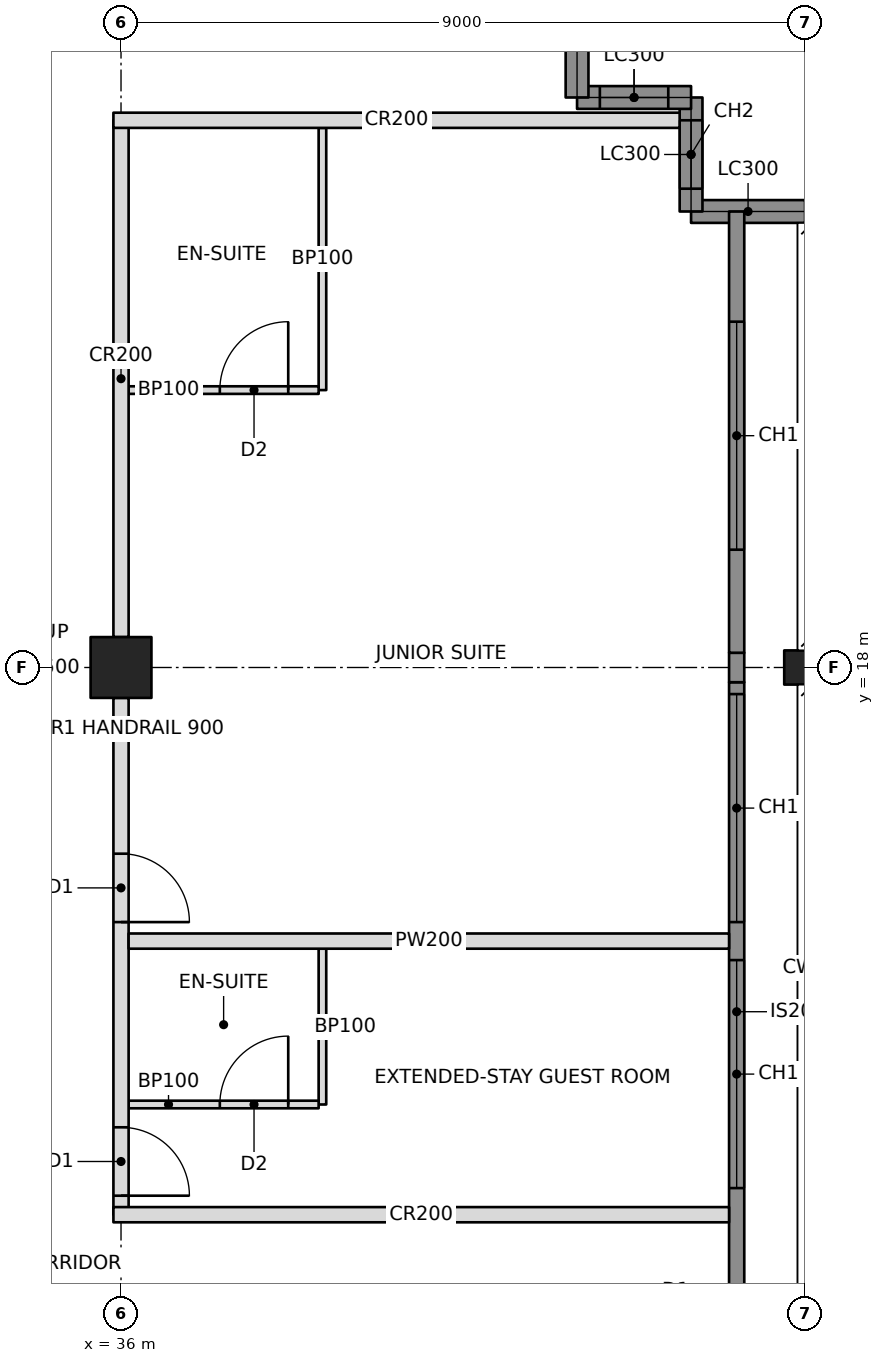
"""IFC4 building model, lengths in metres.
Left out: names, types, materials, properties, quantities, classifications, styles, units other than length and angle.
Written with IfcOpenShell. Run it as: python <this file> out.ifc"""

import sys

from ifc_helpers import new_model, si_unit, direction, frame, frame_2d, origin, origin_2d, place, context, subcontext, project, spatial, rectangle, hollow_rectangle, i_section, extrude, element, fill, save


model = new_model("IFC4")
c1 = context("Model", 3, precision=1e-05, world=origin(), true_north=direction((0.0, 1.0)))
c2 = subcontext(c1, "Body", "Model", "MODEL_VIEW")
j1 = project(units=[si_unit("LENGTHUNIT", "METRE"), si_unit("PLANEANGLEUNIT", "RADIAN")], contexts=[c1])
p1 = place(None, origin())
s1 = spatial("IfcSite", under=j1, at=p1, CompositionType="ELEMENT")
p2 = place(p1, origin())
s2 = spatial("IfcBuilding", under=s1, at=p2, CompositionType="ELEMENT")
p3 = place(p2, frame((0.0, 0.0, 180.8)))
s3 = spatial("IfcBuildingStorey", under=s2, at=p3, CompositionType="ELEMENT", Elevation=180.8)
p4 = place(p3, frame((36.0, 18.0, 0.0), z_axis=(0.0, 0.0, 1.0), x_axis=(0.0, 1.0, 0.0)))
e1 = element("IfcColumn", 1, at=p4, inside=s3, PredefinedType="COLUMN", context=c2, shape_type="SweptSolid", body=[
    extrude(hollow_rectangle(XDim=0.8, YDim=0.8, WallThickness=0.06, at=origin_2d()), origin(), (0.0, 0.0, 1.0), 3.4),
])
p5 = place(p3, frame((45.0, 18.0, 0.0), z_axis=(0.0, 0.0, 1.0), x_axis=(0.0, 1.0, 0.0)))
e2 = element("IfcColumn", 2, at=p5, inside=s3, PredefinedType="COLUMN", context=c2, shape_type="SweptSolid", body=[
    extrude(i_section(OverallWidth=0.449, OverallDepth=0.549, WebThickness=0.072, FlangeThickness=0.115, at=origin_2d()), origin(), (0.0, 0.0, 1.0), 3.4),
])
p6 = place(p3, frame((45.0, 24.0, 0.0), z_axis=(0.0, 0.0, 1.0), x_axis=(-1.0, 0.0, 0.0)))
e3 = element("IfcWall", 3, at=p6, inside=s3, PredefinedType="SOLIDWALL", context=c2, shape_type="SweptSolid", body=[
    extrude(rectangle(XDim=1.5, YDim=0.3, at=frame_2d((0.75, 0.0))), origin(), (0.0, 0.0, 1.0), 2.42),
])
p7 = place(p3, frame((43.5, 24.0, 0.0), z_axis=(0.0, 0.0, 1.0), x_axis=(0.0, 1.0, 0.0)))
e4 = element("IfcWall", 4, at=p7, inside=s3, PredefinedType="SOLIDWALL", context=c2, shape_type="SweptSolid", body=[
    extrude(rectangle(XDim=1.5, YDim=0.3, at=frame_2d((0.75, 0.0))), origin(), (0.0, 0.0, 1.0), 3.2),
])
p8 = place(p7, frame((0.3, 0.0, 0.6)))
e5 = element("IfcOpeningElement", 5, at=p8, cuts=e4, PredefinedType="OPENING", context=c2, shape_type="SweptSolid", body=[
    extrude(rectangle(XDim=0.9, YDim=2.2, at=frame_2d((0.45, 1.1))), frame((0.0, 0.16, 0.0), z_axis=(0.0, -1.0, 0.0), x_axis=(1.0, 0.0, 0.0)), (0.0, 0.0, 1.0), 0.32),
])
p9 = place(p3, frame((43.5, 25.5, 0.0), z_axis=(0.0, 0.0, 1.0), x_axis=(-1.0, 0.0, 0.0)))
e6 = element("IfcWall", 6, at=p9, inside=s3, PredefinedType="SOLIDWALL", context=c2, shape_type="SweptSolid", body=[
    extrude(rectangle(XDim=1.5, YDim=0.3, at=frame_2d((0.75, 0.0))), origin(), (0.0, 0.0, 1.0), 3.2),
])
p10 = place(p9, frame((0.3, 0.0, 0.6)))
e7 = element("IfcOpeningElement", 7, at=p10, cuts=e6, PredefinedType="OPENING", context=c2, shape_type="SweptSolid", body=[
    extrude(rectangle(XDim=0.9, YDim=2.2, at=frame_2d((0.45, 1.1))), frame((0.0, 0.16, 0.0), z_axis=(0.0, -1.0, 0.0), x_axis=(1.0, 0.0, 0.0)), (0.0, 0.0, 1.0), 0.32),
])
p11 = place(p3, frame((42.0, 25.5, 0.0), z_axis=(0.0, 0.0, 1.0), x_axis=(0.0, 1.0, 0.0)))
e8 = element("IfcWall", 8, at=p11, inside=s3, PredefinedType="SOLIDWALL", context=c2, shape_type="SweptSolid", body=[
    extrude(rectangle(XDim=1.5, YDim=0.3, at=frame_2d((0.75, 0.0))), origin(), (0.0, 0.0, 1.0), 2.42),
])
p12 = place(p3, frame((36.0, 10.8, 0.0), z_axis=(0.0, 0.0, 1.0), x_axis=(0.0, 1.0, 0.0)))
e9 = element("IfcWall", 9, at=p12, inside=s3, PredefinedType="PARTITIONING", context=c2, shape_type="SweptSolid", body=[
    extrude(rectangle(XDim=6.8, YDim=0.2, at=frame_2d((3.4, 0.0))), origin(), (0.0, 0.0, 1.0), 2.405),
])
p13 = place(p12, frame((0.25, 0.0, 0.0)))
e10 = element("IfcOpeningElement", 10, at=p13, cuts=e9, PredefinedType="OPENING", context=c2, shape_type="SweptSolid", body=[
    extrude(rectangle(XDim=0.9, YDim=2.1, at=frame_2d((0.45, 1.05))), frame((0.0, 0.11, 0.0), z_axis=(0.0, -1.0, 0.0), x_axis=(1.0, 0.0, 0.0)), (0.0, 0.0, 1.0), 0.22),
])
p14 = place(p12, frame((3.85, 0.0, 0.0)))
e11 = element("IfcOpeningElement", 11, at=p14, cuts=e9, PredefinedType="OPENING", context=c2, shape_type="SweptSolid", body=[
    extrude(rectangle(XDim=0.9, YDim=2.1, at=frame_2d((0.45, 1.05))), frame((0.0, 0.11, 0.0), z_axis=(0.0, -1.0, 0.0), x_axis=(1.0, 0.0, 0.0)), (0.0, 0.0, 1.0), 0.22),
])
p15 = place(p3, frame((36.0, 18.4, 0.0), z_axis=(0.0, 0.0, 1.0), x_axis=(0.0, 1.0, 0.0)))
e12 = element("IfcWall", 12, at=p15, inside=s3, PredefinedType="PARTITIONING", context=c2, shape_type="SweptSolid", body=[
    extrude(rectangle(XDim=6.8, YDim=0.2, at=frame_2d((3.4, 0.0))), origin(), (0.0, 0.0, 1.0), 2.405),
])
p16 = place(p3, frame((35.9, 10.8, 0.0), z_axis=(0.0, 0.0, 1.0), x_axis=(1.0, 0.0, 0.0)))
e13 = element("IfcWall", 13, at=p16, inside=s3, PredefinedType="PARTITIONING", context=c2, shape_type="SweptSolid", body=[
    extrude(rectangle(XDim=8.1, YDim=0.2, at=frame_2d((4.05, 0.0))), origin(), (0.0, 0.0, 1.0), 2.404),
])
p17 = place(p3, frame((35.9, 25.2, 0.0), z_axis=(0.0, 0.0, 1.0), x_axis=(1.0, 0.0, 0.0)))
e14 = element("IfcWall", 14, at=p17, inside=s3, PredefinedType="PARTITIONING", context=c2, shape_type="SweptSolid", body=[
    extrude(rectangle(XDim=7.45, YDim=0.2, at=frame_2d((3.725, 0.0))), origin(), (0.0, 0.0, 1.0), 2.404),
])
p18 = place(p3, frame((36.1, 14.4, 0.0), z_axis=(0.0, 0.0, 1.0), x_axis=(1.0, 0.0, 0.0)))
e15 = element("IfcWall", 15, at=p18, inside=s3, PredefinedType="PARTITIONING", context=c2, shape_type="SweptSolid", body=[
    extrude(rectangle(XDim=7.9, YDim=0.2, at=frame_2d((3.95, 0.0))), origin(), (0.0, 0.0, 1.0), 2.404),
])
p19 = place(p3, frame((38.65, 12.25, 0.0), z_axis=(0.0, 0.0, 1.0), x_axis=(0.0, 1.0, 0.0)))
e16 = element("IfcWall", 16, at=p19, inside=s3, PredefinedType="PARTITIONING", context=c2, shape_type="SweptSolid", body=[
    extrude(rectangle(XDim=2.05, YDim=0.1, at=frame_2d((1.025, 0.0))), origin(), (0.0, 0.0, 1.0), 3.2),
])
p20 = place(p3, frame((36.1, 12.25, 0.0), z_axis=(0.0, 0.0, 1.0), x_axis=(1.0, 0.0, 0.0)))
e17 = element("IfcWall", 17, at=p20, inside=s3, PredefinedType="PARTITIONING", context=c2, shape_type="SweptSolid", body=[
    extrude(rectangle(XDim=2.5, YDim=0.1, at=frame_2d((1.25, 0.0))), origin(), (0.0, 0.0, 1.0), 2.404),
])
p21 = place(p20, frame((1.2, 0.0, 0.0)))
e18 = element("IfcOpeningElement", 18, at=p21, cuts=e17, PredefinedType="OPENING", context=c2, shape_type="SweptSolid", body=[
    extrude(rectangle(XDim=0.9, YDim=2.1, at=frame_2d((0.45, 1.05))), frame((0.0, 0.06, 0.0), z_axis=(0.0, -1.0, 0.0), x_axis=(1.0, 0.0, 0.0)), (0.0, 0.0, 1.0), 0.12),
])
p22 = place(p3, frame((38.65, 21.65, 0.0), z_axis=(0.0, 0.0, 1.0), x_axis=(0.0, 1.0, 0.0)))
e19 = element("IfcWall", 19, at=p22, inside=s3, PredefinedType="PARTITIONING", context=c2, shape_type="SweptSolid", body=[
    extrude(rectangle(XDim=3.45, YDim=0.1, at=frame_2d((1.725, 0.0))), origin(), (0.0, 0.0, 1.0), 3.2),
])
p23 = place(p3, frame((36.1, 21.65, 0.0), z_axis=(0.0, 0.0, 1.0), x_axis=(1.0, 0.0, 0.0)))
e20 = element("IfcWall", 20, at=p23, inside=s3, PredefinedType="PARTITIONING", context=c2, shape_type="SweptSolid", body=[
    extrude(rectangle(XDim=2.5, YDim=0.1, at=frame_2d((1.25, 0.0))), origin(), (0.0, 0.0, 1.0), 2.404),
])
p24 = place(p23, frame((1.2, 0.0, 0.0)))
e21 = element("IfcOpeningElement", 21, at=p24, cuts=e20, PredefinedType="OPENING", context=c2, shape_type="SweptSolid", body=[
    extrude(rectangle(XDim=0.9, YDim=2.1, at=frame_2d((0.45, 1.05))), frame((0.0, 0.06, 0.0), z_axis=(0.0, -1.0, 0.0), x_axis=(1.0, 0.0, 0.0)), (0.0, 0.0, 1.0), 0.12),
])
p25 = place(p3, frame((44.1, 9.135, 0.0), z_axis=(0.0, 0.0, 1.0), x_axis=(0.0, 1.0, 0.0)))
e22 = element("IfcWall", 22, at=p25, inside=s3, PredefinedType="SOLIDWALL", context=c2, shape_type="SweptSolid", body=[
    extrude(rectangle(XDim=8.671, YDim=0.2, at=frame_2d((4.335, 0.0))), origin(), (0.0, 0.0, 1.0), 3.2),
])
p26 = place(p25, frame((2.015, 0.0, 0.6)))
e23 = element("IfcOpeningElement", 23, at=p26, cuts=e22, PredefinedType="OPENING", context=c2, shape_type="SweptSolid", body=[
    extrude(rectangle(XDim=3.0, YDim=2.2, at=frame_2d((1.5, 1.1))), frame((0.0, 0.11, 0.0), z_axis=(0.0, -1.0, 0.0), x_axis=(1.0, 0.0, 0.0)), (0.0, 0.0, 1.0), 0.22),
])
p27 = place(p25, frame((5.515, 0.0, 0.6)))
e24 = element("IfcOpeningElement", 24, at=p27, cuts=e22, PredefinedType="OPENING", context=c2, shape_type="SweptSolid", body=[
    extrude(rectangle(XDim=3.0, YDim=2.2, at=frame_2d((1.5, 1.1))), frame((0.0, 0.11, 0.0), z_axis=(0.0, -1.0, 0.0), x_axis=(1.0, 0.0, 0.0)), (0.0, 0.0, 1.0), 0.22),
])
p28 = place(p3, frame((44.1, 17.806, 0.0), z_axis=(0.0, 0.0, 1.0), x_axis=(0.0, 1.0, 0.0)))
e25 = element("IfcWall", 25, at=p28, inside=s3, PredefinedType="SOLIDWALL", context=c2, shape_type="SweptSolid", body=[
    extrude(rectangle(XDim=0.388, YDim=0.2, at=frame_2d((0.194, 0.0))), origin(), (0.0, 0.0, 1.0), 2.404),
])
p29 = place(p3, frame((44.1, 18.194, 0.0), z_axis=(0.0, 0.0, 1.0), x_axis=(0.0, 1.0, 0.0)))
e26 = element("IfcWall", 26, at=p29, inside=s3, PredefinedType="SOLIDWALL", context=c2, shape_type="SweptSolid", body=[
    extrude(rectangle(XDim=5.806, YDim=0.2, at=frame_2d((2.903, 0.0))), origin(), (0.0, 0.0, 1.0), 3.2),
])
p30 = place(p29, frame((1.356, 0.0, 0.6)))
e27 = element("IfcOpeningElement", 27, at=p30, cuts=e26, PredefinedType="OPENING", context=c2, shape_type="SweptSolid", body=[
    extrude(rectangle(XDim=3.0, YDim=2.2, at=frame_2d((1.5, 1.1))), frame((0.0, 0.11, 0.0), z_axis=(0.0, -1.0, 0.0), x_axis=(1.0, 0.0, 0.0)), (0.0, 0.0, 1.0), 0.22),
])
p31 = place(p8, origin())
e28 = element("IfcWindow", 28, at=p31, inside=s3, PartitioningType="SINGLE_PANEL", PredefinedType="WINDOW", context=c2, shape_type="SweptSolid", body=[
    extrude(rectangle(XDim=0.9, YDim=2.2, at=frame_2d((0.45, 1.1))), frame((0.0, 0.03, 0.0), z_axis=(0.0, -1.0, 0.0), x_axis=(1.0, 0.0, 0.0)), (0.0, 0.0, 1.0), 0.06),
])
fill(e5, e28)
p32 = place(p10, origin())
e29 = element("IfcWindow", 29, at=p32, inside=s3, PartitioningType="SINGLE_PANEL", PredefinedType="WINDOW", context=c2, shape_type="SweptSolid", body=[
    extrude(rectangle(XDim=0.9, YDim=2.2, at=frame_2d((0.45, 1.1))), frame((0.0, 0.03, 0.0), z_axis=(0.0, -1.0, 0.0), x_axis=(1.0, 0.0, 0.0)), (0.0, 0.0, 1.0), 0.06),
])
fill(e7, e29)
p33 = place(p26, origin())
e30 = element("IfcWindow", 30, at=p33, inside=s3, PartitioningType="TRIPLE_PANEL_VERTICAL", PredefinedType="WINDOW", context=c2, shape_type="SweptSolid", body=[
    extrude(rectangle(XDim=3.0, YDim=2.2, at=frame_2d((1.5, 1.1))), frame((0.0, 0.03, 0.0), z_axis=(0.0, -1.0, 0.0), x_axis=(1.0, 0.0, 0.0)), (0.0, 0.0, 1.0), 0.06),
])
fill(e23, e30)
p34 = place(p27, origin())
e31 = element("IfcWindow", 31, at=p34, inside=s3, PartitioningType="TRIPLE_PANEL_VERTICAL", PredefinedType="WINDOW", context=c2, shape_type="SweptSolid", body=[
    extrude(rectangle(XDim=3.0, YDim=2.2, at=frame_2d((1.5, 1.1))), frame((0.0, 0.03, 0.0), z_axis=(0.0, -1.0, 0.0), x_axis=(1.0, 0.0, 0.0)), (0.0, 0.0, 1.0), 0.06),
])
fill(e24, e31)
p35 = place(p30, origin())
e32 = element("IfcWindow", 32, at=p35, inside=s3, PartitioningType="TRIPLE_PANEL_VERTICAL", PredefinedType="WINDOW", context=c2, shape_type="SweptSolid", body=[
    extrude(rectangle(XDim=3.0, YDim=2.2, at=frame_2d((1.5, 1.1))), frame((0.0, 0.03, 0.0), z_axis=(0.0, -1.0, 0.0), x_axis=(1.0, 0.0, 0.0)), (0.0, 0.0, 1.0), 0.06),
])
fill(e27, e32)
p36 = place(p21, origin())
e33 = element("IfcDoor", 33, at=p36, inside=s3, OperationType="SINGLE_SWING_RIGHT", PredefinedType="DOOR", context=c2, shape_type="SweptSolid", body=[
    extrude(rectangle(XDim=0.9, YDim=2.1, at=frame_2d((0.45, 1.05))), frame((0.0, 0.025, 0.0), z_axis=(0.0, -1.0, 0.0), x_axis=(1.0, 0.0, 0.0)), (0.0, 0.0, 1.0), 0.05),
])
fill(e18, e33)
p37 = place(p13, frame((0.9, 0.0, 0.0), z_axis=(0.0, 0.0, 1.0), x_axis=(-1.0, 0.0, 0.0)))
e34 = element("IfcDoor", 34, at=p37, inside=s3, OperationType="SINGLE_SWING_RIGHT", PredefinedType="DOOR", context=c2, shape_type="SweptSolid", body=[
    extrude(rectangle(XDim=0.9, YDim=2.1, at=frame_2d((0.45, 1.05))), frame((0.0, 0.025, 0.0), z_axis=(0.0, -1.0, 0.0), x_axis=(1.0, 0.0, 0.0)), (0.0, 0.0, 1.0), 0.05),
])
fill(e10, e34)
p38 = place(p24, origin())
e35 = element("IfcDoor", 35, at=p38, inside=s3, OperationType="SINGLE_SWING_RIGHT", PredefinedType="DOOR", context=c2, shape_type="SweptSolid", body=[
    extrude(rectangle(XDim=0.9, YDim=2.1, at=frame_2d((0.45, 1.05))), frame((0.0, 0.025, 0.0), z_axis=(0.0, -1.0, 0.0), x_axis=(1.0, 0.0, 0.0)), (0.0, 0.0, 1.0), 0.05),
])
fill(e21, e35)
p39 = place(p14, frame((0.9, 0.0, 0.0), z_axis=(0.0, 0.0, 1.0), x_axis=(-1.0, 0.0, 0.0)))
e36 = element("IfcDoor", 36, at=p39, inside=s3, OperationType="SINGLE_SWING_RIGHT", PredefinedType="DOOR", context=c2, shape_type="SweptSolid", body=[
    extrude(rectangle(XDim=0.9, YDim=2.1, at=frame_2d((0.45, 1.05))), frame((0.0, 0.025, 0.0), z_axis=(0.0, -1.0, 0.0), x_axis=(1.0, 0.0, 0.0)), (0.0, 0.0, 1.0), 0.05),
])
fill(e11, e36)
save(model, sys.argv[1])
